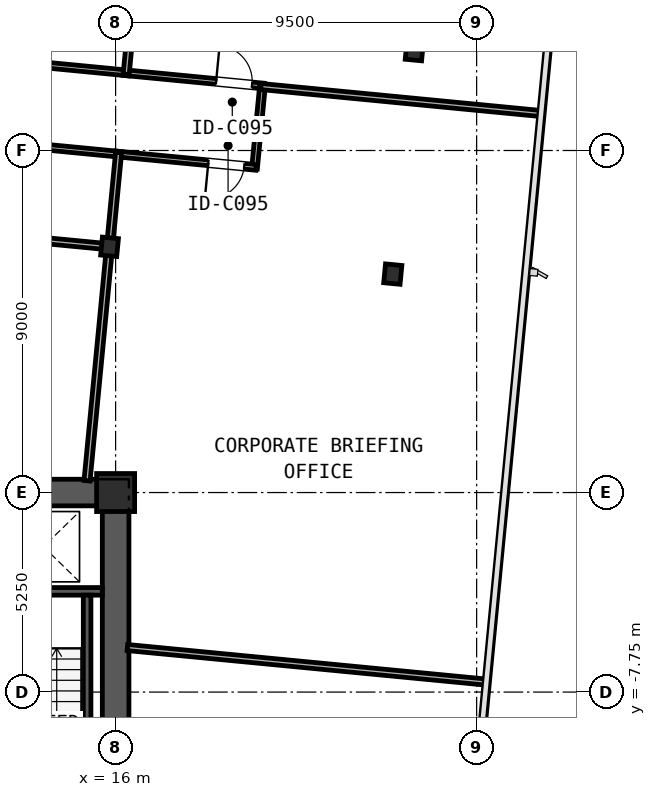
"""IFC4 building model, lengths in metres.
Left out: names, types, materials, properties, quantities, classifications, styles, units other than length and angle.
Written with IfcOpenShell. Run it as: python <this file> out.ifc"""

import sys

from ifc_helpers import new_model, si_unit, direction, frame, frame_2d, origin, origin_2d, place, context, subcontext, project, spatial, rectangle, i_section, extrude, element, fill, save


model = new_model("IFC4")
c1 = context("Model", 3, precision=1e-05, world=origin(), true_north=direction((0.0, 1.0)))
c2 = subcontext(c1, "Body", "Model", "MODEL_VIEW")
j1 = project(units=[si_unit("LENGTHUNIT", "METRE"), si_unit("PLANEANGLEUNIT", "RADIAN")], contexts=[c1])
p1 = place(None, origin())
s1 = spatial("IfcSite", under=j1, at=p1, CompositionType="ELEMENT")
p2 = place(p1, origin())
s2 = spatial("IfcBuilding", under=s1, at=p2, CompositionType="ELEMENT")
p3 = place(p2, frame((0.0, 0.0, 160.05)))
s3 = spatial("IfcBuildingStorey", under=s2, at=p3, CompositionType="ELEMENT", Elevation=160.05)
p4 = place(p3, frame((-16.35, -2.5, 0.0), z_axis=(0.0, 0.0, 1.0), x_axis=(1.0, 0.0, 0.0)))
e1 = element("IfcWall", 1, at=p4, inside=s3, PredefinedType="SHEAR", context=c2, shape_type="SweptSolid", body=[
    extrude(rectangle(XDim=32.7, YDim=0.7, at=frame_2d((16.35, 0.0))), origin(), (0.0, 0.0, 1.0), 2.91),
])
p5 = place(p4, frame((5.975, 0.0, 0.0)))
e2 = element("IfcOpeningElement", 2, at=p5, cuts=e1, PredefinedType="OPENING", context=c2, shape_type="SweptSolid", body=[
    extrude(rectangle(XDim=1.15, YDim=2.0, at=frame_2d((0.575, 1.0))), frame((0.0, 0.36, 0.0), z_axis=(0.0, -1.0, 0.0), x_axis=(1.0, 0.0, 0.0)), (0.0, 0.0, 1.0), 0.72),
])
p6 = place(p4, frame((15.55, 0.0, 0.0)))
e3 = element("IfcOpeningElement", 3, at=p6, cuts=e1, PredefinedType="OPENING", context=c2, shape_type="SweptSolid", body=[
    extrude(rectangle(XDim=1.6, YDim=2.0, at=frame_2d((0.8, 1.0))), frame((0.0, 0.36, 0.0), z_axis=(0.0, -1.0, 0.0), x_axis=(1.0, 0.0, 0.0)), (0.0, 0.0, 1.0), 0.72),
])
p7 = place(p4, frame((25.575, 0.0, 0.0)))
e4 = element("IfcOpeningElement", 4, at=p7, cuts=e1, PredefinedType="OPENING", context=c2, shape_type="SweptSolid", body=[
    extrude(rectangle(XDim=1.15, YDim=2.0, at=frame_2d((0.575, 1.0))), frame((0.0, 0.36, 0.0), z_axis=(0.0, -1.0, 0.0), x_axis=(1.0, 0.0, 0.0)), (0.0, 0.0, 1.0), 0.72),
])
p8 = place(p3, frame((16.0, -12.65, 0.0), z_axis=(0.0, 0.0, 1.0), x_axis=(0.0, 1.0, 0.0)))
e5 = element("IfcWall", 5, at=p8, inside=s3, PredefinedType="SHEAR", context=c2, shape_type="SweptSolid", body=[
    extrude(rectangle(XDim=9.8, YDim=0.7, at=frame_2d((4.9, 0.0))), origin(), (0.0, 0.0, 1.0), 2.91),
])
p9 = place(p3, frame((12.0, -5.1, 0.0), z_axis=(0.0, 0.0, 1.0), x_axis=(1.0, 0.0, 0.0)))
e6 = element("IfcWall", 6, at=p9, inside=s3, PredefinedType="SOLIDWALL", context=c2, shape_type="SweptSolid", body=[
    extrude(rectangle(XDim=3.65, YDim=0.2, at=frame_2d((1.825, 0.0))), origin(), (0.0, 0.0, 1.0), 3.19),
])
p10 = place(p3, frame((15.25, -12.2, 0.0), z_axis=(0.0, 0.0, 1.0), x_axis=(0.0, 1.0, 0.0)))
e7 = element("IfcWall", 7, at=p10, inside=s3, PredefinedType="SOLIDWALL", context=c2, shape_type="SweptSolid", body=[
    extrude(rectangle(XDim=7.0, YDim=0.2, at=frame_2d((3.5, 0.0))), origin(), (0.0, 0.0, 1.0), 3.19),
])
p11 = place(p3, frame((16.0, -2.5, 0.0), z_axis=(0.0, 0.0, 1.0), x_axis=(1.0, 0.0, 0.0)))
e8 = element("IfcColumn", 8, at=p11, inside=s3, PredefinedType="COLUMN", context=c2, shape_type="SweptSolid", body=[
    extrude(rectangle(XDim=1.0, YDim=1.0, at=origin_2d()), origin(), (0.0, 0.0, 1.0), 3.45),
])
p12 = place(p3, frame((15.84, 3.965, 0.0), z_axis=(0.0, 0.0, 1.0), x_axis=(0.995396198367, -0.09584575252, 0.0)))
e9 = element("IfcColumn", 9, at=p12, inside=s3, PredefinedType="COLUMN", context=c2, shape_type="SweptSolid", body=[
    extrude(i_section(OverallWidth=0.424, OverallDepth=0.474, WebThickness=0.048, FlangeThickness=0.077, FilletRadius=0.031, at=origin_2d()), origin(), (0.0, 0.0, 1.0), 3.45),
])
for number, where, z_axis, x_axis in (
    (10, (23.293, 3.248, 0.0), (0.0, 0.0, 1.0), (0.995, -0.096, 0.0)),
    (11, (23.86, 9.128, 0.0), (0.0, 0.0, 1.0), (0.995, -0.096, 0.0)),
):
    element("IfcColumn", number, at=place(p3, frame(where, z_axis=z_axis, x_axis=x_axis)), inside=s3, PredefinedType="COLUMN", context=c2, shape_type="SweptSolid", body=[
        extrude(i_section(OverallWidth=0.432, OverallDepth=0.498, WebThickness=0.056, FlangeThickness=0.089, FilletRadius=0.031, at=origin_2d()), origin(), (0.0, 0.0, 1.0), 3.45),
    ])
p13 = place(p3, frame((8.28, 9.314, 0.0), z_axis=(0.0, 0.0, 1.0), x_axis=(0.995395467524, -0.095853342309, 0.0)))
e12 = element("IfcWall", 12, at=p13, inside=s3, PredefinedType="PARTITIONING", context=c2, shape_type="SweptSolid", body=[
    extrude(rectangle(XDim=8.12, YDim=0.15, at=frame_2d((4.06, 0.0))), origin(), (0.0, 0.0, 1.0), 2.479),
])
p14 = place(p13, frame((3.585, 0.0, 0.0)))
e13 = element("IfcOpeningElement", 13, at=p14, cuts=e12, PredefinedType="OPENING", context=c2, shape_type="SweptSolid", body=[
    extrude(rectangle(XDim=0.95, YDim=2.15, at=frame_2d((0.475, 1.075))), frame((0.0, 0.085, 0.0), z_axis=(0.0, -1.0, 0.0), x_axis=(1.0, 0.0, 0.0)), (0.0, 0.0, 1.0), 0.17),
])
p15 = place(p3, frame((16.199, 8.552, 0.0), z_axis=(0.0, 0.0, 1.0), x_axis=(0.995391104887, -0.095898635608, 0.0)))
e14 = element("IfcWall", 14, at=p15, inside=s3, PredefinedType="PARTITIONING", context=c2, shape_type="SweptSolid", body=[
    extrude(rectangle(XDim=3.722, YDim=0.15, at=frame_2d((1.861, 0.0))), origin(), (0.0, 0.0, 1.0), 2.479),
])
p16 = place(p15, frame((2.457, 0.0, 0.0)))
e15 = element("IfcOpeningElement", 15, at=p16, cuts=e14, PredefinedType="OPENING", context=c2, shape_type="SweptSolid", body=[
    extrude(rectangle(XDim=0.95, YDim=2.15, at=frame_2d((0.475, 1.075))), frame((0.0, 0.085, 0.0), z_axis=(0.0, -1.0, 0.0), x_axis=(1.0, 0.0, 0.0)), (0.0, 0.0, 1.0), 0.17),
])
p17 = place(p3, frame((16.156, 6.396, 0.0), z_axis=(0.0, 0.0, 1.0), x_axis=(-0.99539478422, 0.095860437863, 0.0)))
e16 = element("IfcWall", 16, at=p17, inside=s3, PredefinedType="PARTITIONING", context=c2, shape_type="SweptSolid", body=[
    extrude(rectangle(XDim=10.936, YDim=0.15, at=frame_2d((5.468, 0.0))), origin(), (0.0, 0.0, 1.0), 2.479),
])
p18 = place(p17, frame((3.675, 0.0, 0.0)))
e17 = element("IfcOpeningElement", 17, at=p18, cuts=e16, PredefinedType="OPENING", context=c2, shape_type="SweptSolid", body=[
    extrude(rectangle(XDim=0.85, YDim=2.05, at=frame_2d((0.425, 1.025))), frame((0.0, 0.085, 0.0), z_axis=(0.0, -1.0, 0.0), x_axis=(1.0, 0.0, 0.0)), (0.0, 0.0, 1.0), 0.17),
])
p19 = place(p3, frame((19.866, 8.219, 0.0), z_axis=(0.0, 0.0, 1.0), x_axis=(-0.095773447772, -0.995403157872, 0.0)))
e18 = element("IfcWall", 18, at=p19, inside=s3, PredefinedType="PARTITIONING", context=c2, shape_type="SweptSolid", body=[
    extrude(rectangle(XDim=2.21, YDim=0.15, at=frame_2d((1.105, 0.0))), origin(), (0.0, 0.0, 1.0), 2.718),
])
p20 = place(p3, frame((19.698, 6.055, 0.0), z_axis=(0.0, 0.0, 1.0), x_axis=(-0.995397364202, 0.095833644092, 0.0)))
e19 = element("IfcWall", 19, at=p20, inside=s3, PredefinedType="PARTITIONING", context=c2, shape_type="SweptSolid", body=[
    extrude(rectangle(XDim=3.722, YDim=0.15, at=frame_2d((1.861, 0.0))), origin(), (0.0, 0.0, 1.0), 2.479),
])
p21 = place(p20, frame((0.315, 0.0, 0.0)))
e20 = element("IfcOpeningElement", 20, at=p21, cuts=e19, PredefinedType="OPENING", context=c2, shape_type="SweptSolid", body=[
    extrude(rectangle(XDim=0.95, YDim=2.15, at=frame_2d((0.475, 1.075))), frame((0.0, 0.085, 0.0), z_axis=(0.0, -1.0, 0.0), x_axis=(1.0, 0.0, 0.0)), (0.0, 0.0, 1.0), 0.17),
])
p22 = place(p3, frame((16.389, 9.671, 0.0), z_axis=(0.0, 0.0, 1.0), x_axis=(-0.095811626391, -0.995399483749, 0.0)))
e21 = element("IfcWall", 21, at=p22, inside=s3, PredefinedType="PARTITIONING", context=c2, shape_type="SweptSolid", body=[
    extrude(rectangle(XDim=1.172, YDim=0.16, at=frame_2d((0.586, 0.0))), origin(), (0.0, 0.0, 1.0), 2.479),
])
p23 = place(p3, frame((27.236, 7.469, 0.0), z_axis=(0.0, 0.0, 1.0), x_axis=(-0.995396228159, 0.095845443117, 0.0)))
e22 = element("IfcWall", 22, at=p23, inside=s3, PredefinedType="PARTITIONING", context=c2, shape_type="SweptSolid", body=[
    extrude(rectangle(XDim=7.448, YDim=0.16, at=frame_2d((3.724, 0.0))), origin(), (0.0, 0.0, 1.0), 2.557),
])
p24 = place(p3, frame((15.665, 3.982, 0.0), z_axis=(0.0, 0.0, 1.0), x_axis=(-0.995396667246, 0.095840882902, 0.0)))
e23 = element("IfcWall", 23, at=p24, inside=s3, PredefinedType="PARTITIONING", context=c2, shape_type="SweptSolid", body=[
    extrude(rectangle(XDim=7.604, YDim=0.16, at=frame_2d((3.802, 0.0))), origin(), (0.0, 0.0, 1.0), 2.479),
])
p25 = place(p3, frame((16.079, 6.444, 0.0), z_axis=(0.0, 0.0, 1.0), x_axis=(-0.095794827695, -0.995401100555, 0.0)))
e24 = element("IfcWall", 24, at=p25, inside=s3, PredefinedType="PARTITIONING", context=c2, shape_type="SweptSolid", body=[
    extrude(rectangle(XDim=2.314, YDim=0.16, at=frame_2d((1.157, 0.0))), origin(), (0.0, 0.0, 1.0), 2.479),
])
p26 = place(p3, frame((15.823, 3.79, 0.0), z_axis=(0.0, 0.0, 1.0), x_axis=(-0.095865726078, -0.99539427493, 0.0)))
e25 = element("IfcWall", 25, at=p26, inside=s3, PredefinedType="PARTITIONING", context=c2, shape_type="SweptSolid", body=[
    extrude(rectangle(XDim=6.008, YDim=0.16, at=frame_2d((3.004, 0.0))), origin(), (0.0, 0.0, 1.0), 2.225),
])
p27 = place(p3, frame((25.796, -7.492, 0.0), z_axis=(0.0, 0.0, 1.0), x_axis=(-0.995396487733, 0.095842747294, 0.0)))
e26 = element("IfcWall", 26, at=p27, inside=s3, PredefinedType="PARTITIONING", context=c2, shape_type="SweptSolid", body=[
    extrude(rectangle(XDim=9.53, YDim=0.16, at=frame_2d((4.765, 0.0))), origin(), (0.0, 0.0, 1.0), 2.225),
])
p28 = place(p16, frame((0.95, 0.0, 0.0), z_axis=(0.0, 0.0, 1.0), x_axis=(-1.0, 0.0, 0.0)))
e27 = element("IfcDoor", 27, at=p28, inside=s3, OperationType="SINGLE_SWING_LEFT", PredefinedType="DOOR", context=c2, shape_type="SweptSolid", body=[
    extrude(rectangle(XDim=0.95, YDim=2.15, at=frame_2d((0.475, 1.075))), frame((0.0, 0.025, 0.0), z_axis=(0.0, -1.0, 0.0), x_axis=(1.0, 0.0, 0.0)), (0.0, 0.0, 1.0), 0.05),
])
fill(e15, e27)
p29 = place(p21, frame((0.95, 0.0, 0.0), z_axis=(0.0, 0.0, 1.0), x_axis=(-1.0, 0.0, 0.0)))
e28 = element("IfcDoor", 28, at=p29, inside=s3, OperationType="SINGLE_SWING_RIGHT", PredefinedType="DOOR", context=c2, shape_type="SweptSolid", body=[
    extrude(rectangle(XDim=0.95, YDim=2.15, at=frame_2d((0.475, 1.075))), frame((0.0, 0.025, 0.0), z_axis=(0.0, -1.0, 0.0), x_axis=(1.0, 0.0, 0.0)), (0.0, 0.0, 1.0), 0.05),
])
fill(e20, e28)
save(model, sys.argv[1])
